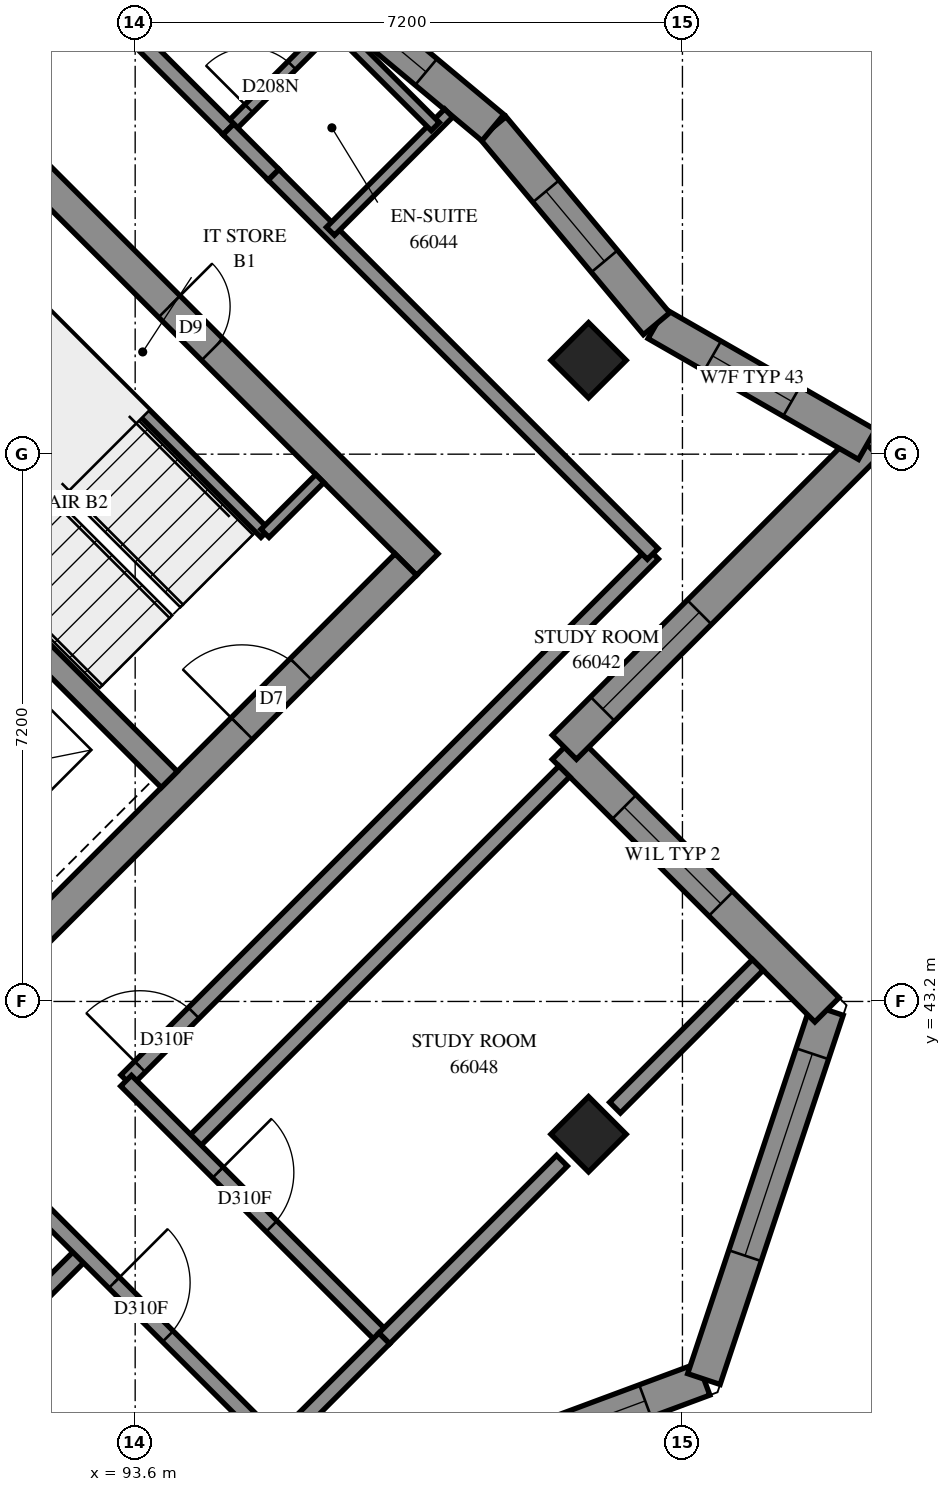
"""IFC4 building model, lengths in metres.
Left out: names, types, materials, properties, quantities, classifications, styles, units other than length and angle.
Written with IfcOpenShell. Run it as: python <this file> out.ifc"""

import sys

from ifc_helpers import new_model, si_unit, direction, frame, frame_2d, origin, origin_2d, place, context, subcontext, project, spatial, polyline, rectangle, outline, extrude, element, fill, save


model = new_model("IFC4")
c1 = context("Model", 3, precision=1e-05, world=origin(), true_north=direction((0.0, 1.0)))
c2 = subcontext(c1, "Body", "Model", "MODEL_VIEW")
j1 = project(units=[si_unit("LENGTHUNIT", "METRE"), si_unit("PLANEANGLEUNIT", "RADIAN")], contexts=[c1])
p1 = place(None, origin())
s1 = spatial("IfcSite", under=j1, at=p1, CompositionType="ELEMENT")
p2 = place(p1, origin())
s2 = spatial("IfcBuilding", under=s1, at=p2, CompositionType="ELEMENT")
p3 = place(p2, frame((0.0, 0.0, 243.8)))
s3 = spatial("IfcBuildingStorey", under=s2, at=p3, CompositionType="ELEMENT", Elevation=243.8)
for number, where, z_axis, x_axis in (
    (1, (99.565, 51.635, 0.0), (0.0, 0.0, 1.0), (0.707, -0.707, 0.0)),
    (2, (99.565, 41.453, 0.0), (0.0, 0.0, 1.0), (0.707, -0.707, 0.0)),
):
    element("IfcColumn", number, at=place(p3, frame(where, z_axis=z_axis, x_axis=x_axis)), inside=s3, PredefinedType="COLUMN", context=c2, shape_type="SweptSolid", body=[
        extrude(rectangle(XDim=0.7, YDim=0.7, at=origin_2d()), origin(), (0.0, 0.0, 1.0), 3.1),
    ])
p4 = place(p3, frame((86.695, 59.696, -0.3), z_axis=(0.0, 0.0, 1.0), x_axis=(0.7071100706, -0.7071034917, 0.0)))
e3 = element("IfcWall", 3, at=p4, inside=s3, PredefinedType="SHEAR", context=c2, shape_type="SweptSolid", body=[
    extrude(rectangle(XDim=15.2, YDim=0.4, at=frame_2d((7.6, 0.0))), origin(), (0.0, 0.0, 1.0), 2.7),
])
p5 = place(p4, frame((10.4, 0.0, 0.3)))
e4 = element("IfcOpeningElement", 4, at=p5, cuts=e3, PredefinedType="OPENING", context=c2, shape_type="SweptSolid", body=[
    extrude(rectangle(XDim=0.8, YDim=2.1, at=frame_2d((0.4, 1.05))), frame((0.0, 0.21, 0.0), z_axis=(0.0, -1.0, 0.0), x_axis=(1.0, 0.0, 0.0)), (0.0, 0.0, 1.0), 0.42),
])
p6 = place(p3, frame((86.978, 38.766, -0.3), z_axis=(0.0, 0.0, 1.0), x_axis=(0.7071067812, 0.7071067812, 0.0)))
e5 = element("IfcWall", 5, at=p6, inside=s3, PredefinedType="SHEAR", context=c2, shape_type="SweptSolid", body=[
    extrude(rectangle(XDim=14.4, YDim=0.4, at=frame_2d((7.2, 0.0))), origin(), (0.0, 0.0, 1.0), 2.7),
])
p7 = place(p6, frame((4.55, 0.0, 0.3)))
e6 = element("IfcOpeningElement", 6, at=p7, cuts=e5, PredefinedType="OPENING", context=c2, shape_type="SweptSolid", body=[
    extrude(rectangle(XDim=1.1, YDim=2.1, at=frame_2d((0.55, 1.05))), frame((0.0, 0.21, 0.0), z_axis=(0.0, -1.0, 0.0), x_axis=(1.0, 0.0, 0.0)), (0.0, 0.0, 1.0), 0.42),
])
p8 = place(p6, frame((11.35, 0.0, 0.3)))
e7 = element("IfcOpeningElement", 7, at=p8, cuts=e5, PredefinedType="OPENING", context=c2, shape_type="SweptSolid", body=[
    extrude(rectangle(XDim=1.1, YDim=2.1, at=frame_2d((0.55, 1.05))), frame((0.0, 0.21, 0.0), z_axis=(0.0, -1.0, 0.0), x_axis=(1.0, 0.0, 0.0)), (0.0, 0.0, 1.0), 0.42),
])
p9 = place(p3, frame((88.958, 51.211, 0.0), z_axis=(0.0, 0.0, 1.0), x_axis=(0.7070998367, -0.7071137256, 0.0)))
e8 = element("IfcWall", 8, at=p9, inside=s3, PredefinedType="SOLIDWALL", context=c2, shape_type="SweptSolid", body=[
    extrude(rectangle(XDim=7.2, YDim=0.3, at=frame_2d((3.6, 0.0))), origin(), (0.0, 0.0, 1.0), 3.1),
])
p10 = place(p3, frame((96.137, 36.395, 0.0), z_axis=(0.0, 0.0, 1.0), x_axis=(0.937429161, 0.3481760591, 0.0)))
e9 = element("IfcWall", 9, at=p10, inside=s3, PredefinedType="SOLIDWALL", context=c2, shape_type="SweptSolid", body=[
    extrude(outline(polyline([(0.103, -0.225), (5.383, -0.225), (5.168, 0.225), (-0.103, 0.225), (0.103, -0.225)])), origin(), (0.0, 0.0, 1.0), 3.1),
])
p11 = place(p10, frame((1.651, 0.0, 0.45)))
e10 = element("IfcOpeningElement", 10, at=p11, cuts=e9, PredefinedType="OPENING", context=c2, shape_type="SweptSolid", body=[
    extrude(rectangle(XDim=2.8, YDim=2.55, at=frame_2d((1.4, 1.275))), frame((0.0, 0.235, 0.0), z_axis=(0.0, -1.0, 0.0), x_axis=(1.0, 0.0, 0.0)), (0.0, 0.0, 1.0), 0.47),
])
p12 = place(p3, frame((101.082, 38.232, 0.0), z_axis=(0.0, 0.0, 1.0), x_axis=(0.316227766, 0.9486832981, 0.0)))
e11 = element("IfcWall", 11, at=p12, inside=s3, PredefinedType="SOLIDWALL", context=c2, shape_type="SweptSolid", body=[
    extrude(outline(polyline([(-0.108, -0.225), (5.259, -0.225), (4.981, 0.225), (0.108, 0.225), (-0.108, -0.225)])), origin(), (0.0, 0.0, 1.0), 3.1),
])
p13 = place(p12, frame((1.711, 0.0, 0.45)))
e12 = element("IfcOpeningElement", 12, at=p13, cuts=e11, PredefinedType="OPENING", context=c2, shape_type="SweptSolid", body=[
    extrude(rectangle(XDim=2.8, YDim=2.55, at=frame_2d((1.4, 1.275))), frame((0.0, 0.235, 0.0), z_axis=(0.0, -1.0, 0.0), x_axis=(1.0, 0.0, 0.0)), (0.0, 0.0, 1.0), 0.47),
])
p14 = place(p3, frame((102.701, 43.089, 0.0), z_axis=(0.0, 0.0, 1.0), x_axis=(-0.7070965479, 0.7071170144, 0.0)))
e13 = element("IfcWall", 13, at=p14, inside=s3, PredefinedType="SOLIDWALL", context=c2, shape_type="SweptSolid", body=[
    extrude(outline(polyline([(-0.139, -0.225), (4.661, -0.225), (5.111, 0.225), (0.139, 0.225), (-0.139, -0.225)])), origin(), (0.0, 0.0, 1.0), 3.1),
])
p15 = place(p14, frame((1.974, 0.0, 0.6)))
e14 = element("IfcOpeningElement", 14, at=p15, cuts=e13, PredefinedType="OPENING", context=c2, shape_type="SweptSolid", body=[
    extrude(rectangle(XDim=1.8, YDim=1.9, at=frame_2d((0.9, 0.95))), frame((0.0, 0.235, 0.0), z_axis=(0.0, -1.0, 0.0), x_axis=(1.0, 0.0, 0.0)), (0.0, 0.0, 1.0), 0.47),
])
p16 = place(p3, frame((99.246, 46.544, 0.0), z_axis=(0.0, 0.0, 1.0), x_axis=(0.7071067812, 0.7071067812, 0.0)))
e15 = element("IfcWall", 15, at=p16, inside=s3, PredefinedType="SOLIDWALL", context=c2, shape_type="SweptSolid", body=[
    extrude(outline(polyline([(0.225, -0.225), (5.925, -0.225), (5.337, 0.225), (-0.225, 0.225), (0.225, -0.225)])), origin(), (0.0, 0.0, 1.0), 3.1),
])
p17 = place(p16, frame((0.713, 0.0, 0.6)))
e16 = element("IfcOpeningElement", 16, at=p17, cuts=e15, PredefinedType="OPENING", context=c2, shape_type="SweptSolid", body=[
    extrude(rectangle(XDim=1.8, YDim=1.9, at=frame_2d((0.9, 0.95))), frame((0.0, 0.235, 0.0), z_axis=(0.0, -1.0, 0.0), x_axis=(1.0, 0.0, 0.0)), (0.0, 0.0, 1.0), 0.47),
])
p18 = place(p3, frame((103.228, 50.526, 0.0), z_axis=(0.0, 0.0, 1.0), x_axis=(-0.8672062632, 0.4979490909, 0.0)))
e17 = element("IfcWall", 17, at=p18, inside=s3, PredefinedType="SOLIDWALL", context=c2, shape_type="SweptSolid", body=[
    extrude(outline(polyline([(-0.294, -0.225), (3.153, -0.225), (3.233, 0.225), (0.294, 0.225), (-0.294, -0.225)])), origin(), (0.0, 0.0, 1.0), 3.1),
])
p19 = place(p18, frame((1.143, 0.0, 0.45)))
e18 = element("IfcOpeningElement", 18, at=p19, cuts=e17, PredefinedType="OPENING", context=c2, shape_type="SweptSolid", body=[
    extrude(rectangle(XDim=1.2, YDim=2.55, at=frame_2d((0.6, 1.275))), frame((0.0, 0.235, 0.0), z_axis=(0.0, -1.0, 0.0), x_axis=(1.0, 0.0, 0.0)), (0.0, 0.0, 1.0), 0.47),
])
p20 = place(p3, frame((100.459, 52.116, 0.0), z_axis=(0.0, 0.0, 1.0), x_axis=(-0.640760852, 0.767740536, 0.0)))
e19 = element("IfcWall", 19, at=p20, inside=s3, PredefinedType="SOLIDWALL", context=c2, shape_type="SweptSolid", body=[
    extrude(outline(polyline([(0.04, -0.225), (3.381, -0.225), (3.34, 0.225), (-0.04, 0.225), (0.04, -0.225)])), origin(), (0.0, 0.0, 1.0), 3.1),
])
p21 = place(p20, frame((1.07, 0.0, 0.45)))
e20 = element("IfcOpeningElement", 20, at=p21, cuts=e19, PredefinedType="OPENING", context=c2, shape_type="SweptSolid", body=[
    extrude(rectangle(XDim=1.2, YDim=2.55, at=frame_2d((0.6, 1.275))), frame((0.0, 0.235, 0.0), z_axis=(0.0, -1.0, 0.0), x_axis=(1.0, 0.0, 0.0)), (0.0, 0.0, 1.0), 0.47),
])
p22 = place(p3, frame((98.306, 54.696, 0.0), z_axis=(0.0, 0.0, 1.0), x_axis=(-0.7677450318, 0.6407554652, 0.0)))
e21 = element("IfcWall", 21, at=p22, inside=s3, PredefinedType="SOLIDWALL", context=c2, shape_type="SweptSolid", body=[
    extrude(outline(polyline([(-0.02, -0.225), (3.32, -0.225), (3.361, 0.225), (0.02, 0.225), (-0.02, -0.225)])), origin(), (0.0, 0.0, 1.0), 3.1),
])
p23 = place(p22, frame((1.144, 0.0, 0.45)))
e22 = element("IfcOpeningElement", 22, at=p23, cuts=e21, PredefinedType="OPENING", context=c2, shape_type="SweptSolid", body=[
    extrude(rectangle(XDim=1.2, YDim=2.55, at=frame_2d((0.6, 1.275))), frame((0.0, 0.235, 0.0), z_axis=(0.0, -1.0, 0.0), x_axis=(1.0, 0.0, 0.0)), (0.0, 0.0, 1.0), 0.47),
])
p24 = place(p3, frame((91.313, 53.354, 0.0), z_axis=(0.0, 0.0, 1.0), x_axis=(0.7071067812, -0.7071067812, 0.0)))
e23 = element("IfcWall", 23, at=p24, inside=s3, PredefinedType="PARTITIONING", context=c2, shape_type="SweptSolid", body=[
    extrude(rectangle(XDim=5.65, YDim=0.15, at=frame_2d((2.825, 0.0))), origin(), (0.0, 0.0, 1.0), 3.1),
])
p25 = place(p3, frame((95.308, 49.358, 0.0), z_axis=(0.0, 0.0, 1.0), x_axis=(0.70705776, 0.707155799, 0.0)))
e24 = element("IfcWall", 24, at=p25, inside=s3, PredefinedType="PARTITIONING", context=c2, shape_type="SweptSolid", body=[
    extrude(rectangle(XDim=1.02, YDim=0.15, at=frame_2d((0.51, 0.0))), origin(), (0.0, 0.0, 1.0), 3.1),
])
p26 = place(p3, frame((84.929, 31.91, 0.0), z_axis=(0.0, 0.0, 1.0), x_axis=(0.7071067812, 0.7071067812, 0.0)))
e25 = element("IfcWall", 25, at=p26, inside=s3, PredefinedType="PARTITIONING", context=c2, shape_type="SweptSolid", body=[
    extrude(rectangle(XDim=11.297, YDim=0.2, at=frame_2d((5.649, 0.0))), origin(), (0.0, 0.0, 1.0), 3.1),
])
p27 = place(p3, frame((93.483, 42.161, 0.0), z_axis=(0.0, 0.0, 1.0), x_axis=(0.7071067812, 0.7071067812, 0.0)))
e26 = element("IfcWall", 26, at=p27, inside=s3, PredefinedType="PARTITIONING", context=c2, shape_type="SweptSolid", body=[
    extrude(rectangle(XDim=9.8, YDim=0.2, at=frame_2d((4.9, 0.0))), origin(), (0.0, 0.0, 1.0), 3.1),
])
p28 = place(p27, frame((0.255, 0.0, 0.0)))
e27 = element("IfcOpeningElement", 27, at=p28, cuts=e26, PredefinedType="OPENING", context=c2, shape_type="SweptSolid", body=[
    extrude(rectangle(XDim=1.0, YDim=2.1, at=frame_2d((0.5, 1.05))), frame((0.0, 0.11, 0.0), z_axis=(0.0, -1.0, 0.0), x_axis=(1.0, 0.0, 0.0)), (0.0, 0.0, 1.0), 0.22),
])
p29 = place(p3, frame((95.419, 54.077, 0.0), z_axis=(0.0, 0.0, 1.0), x_axis=(0.7071067812, -0.7071067812, 0.0)))
e28 = element("IfcWall", 28, at=p29, inside=s3, PredefinedType="PARTITIONING", context=c2, shape_type="SweptSolid", body=[
    extrude(rectangle(XDim=7.057, YDim=0.2, at=frame_2d((3.528, 0.0))), origin(), (0.0, 0.0, 1.0), 3.1),
])
p30 = place(p3, frame((94.331, 41.313, 0.0), z_axis=(0.0, 0.0, 1.0), x_axis=(0.7071139756, 0.7070995867, 0.0)))
e29 = element("IfcWall", 29, at=p30, inside=s3, PredefinedType="PARTITIONING", context=c2, shape_type="SweptSolid", body=[
    extrude(rectangle(XDim=6.95, YDim=0.2, at=frame_2d((3.475, 0.0))), origin(), (0.0, 0.0, 1.0), 3.1),
])
p31 = place(p3, frame((93.481, 42.157, 0.0), z_axis=(0.0, 0.0, 1.0), x_axis=(0.7071067812, -0.7071067812, 0.0)))
e30 = element("IfcWall", 30, at=p31, inside=s3, PredefinedType="PARTITIONING", context=c2, shape_type="SweptSolid", body=[
    extrude(rectangle(XDim=4.8, YDim=0.2, at=frame_2d((2.4, 0.0))), origin(), (0.0, 0.0, 1.0), 3.1),
])
p32 = place(p31, frame((1.707, 0.0, 0.0)))
e31 = element("IfcOpeningElement", 31, at=p32, cuts=e30, PredefinedType="OPENING", context=c2, shape_type="SweptSolid", body=[
    extrude(rectangle(XDim=1.0, YDim=2.1, at=frame_2d((0.5, 1.05))), frame((0.0, 0.11, 0.0), z_axis=(0.0, -1.0, 0.0), x_axis=(1.0, 0.0, 0.0)), (0.0, 0.0, 1.0), 0.22),
])
p33 = place(p3, frame((92.073, 40.749, 0.0), z_axis=(0.0, 0.0, 1.0), x_axis=(0.7071067812, -0.7071067812, 0.0)))
e32 = element("IfcWall", 32, at=p33, inside=s3, PredefinedType="PARTITIONING", context=c2, shape_type="SweptSolid", body=[
    extrude(rectangle(XDim=4.8, YDim=0.2, at=frame_2d((2.4, 0.0))), origin(), (0.0, 0.0, 1.0), 3.1),
])
p34 = place(p33, frame((1.767, 0.0, 0.0)))
e33 = element("IfcOpeningElement", 33, at=p34, cuts=e32, PredefinedType="OPENING", context=c2, shape_type="SweptSolid", body=[
    extrude(rectangle(XDim=1.0, YDim=2.1, at=frame_2d((0.5, 1.05))), frame((0.0, 0.11, 0.0), z_axis=(0.0, -1.0, 0.0), x_axis=(1.0, 0.0, 0.0)), (0.0, 0.0, 1.0), 0.22),
])
p35 = place(p3, frame((96.877, 38.767, 0.0), z_axis=(0.0, 0.0, 1.0), x_axis=(0.7071067812, 0.7071067812, 0.0)))
e34 = element("IfcWall", 34, at=p35, inside=s3, PredefinedType="PARTITIONING", context=c2, shape_type="SweptSolid", body=[
    extrude(rectangle(XDim=3.306, YDim=0.2, at=frame_2d((1.653, 0.0))), origin(), (0.0, 0.0, 1.0), 2.6),
])
p36 = place(p3, frame((99.913, 41.803, 0.0), z_axis=(0.0, 0.0, 1.0), x_axis=(0.7071067812, 0.7071067812, 0.0)))
e35 = element("IfcWall", 35, at=p36, inside=s3, PredefinedType="PARTITIONING", context=c2, shape_type="SweptSolid", body=[
    extrude(rectangle(XDim=2.656, YDim=0.2, at=frame_2d((1.328, 0.0))), origin(), (0.0, 0.0, 1.0), 3.1),
])
p37 = place(p3, frame((96.169, 53.333, 0.0), z_axis=(0.0, 0.0, 1.0), x_axis=(0.7071067812, 0.7071067812, 0.0)))
e36 = element("IfcWall", 36, at=p37, inside=s3, PredefinedType="PARTITIONING", context=c2, shape_type="SweptSolid", body=[
    extrude(rectangle(XDim=2.2, YDim=0.15, at=frame_2d((1.1, 0.0))), origin(), (0.0, 0.0, 1.0), 3.1),
])
p38 = place(p3, frame((95.463, 37.353, 0.0), z_axis=(0.0, 0.0, 1.0), x_axis=(0.7071067812, 0.7071067812, 0.0)))
e37 = element("IfcWall", 37, at=p38, inside=s3, PredefinedType="PARTITIONING", context=c2, shape_type="SweptSolid", body=[
    extrude(rectangle(XDim=2.0, YDim=0.2, at=frame_2d((1.0, 0.0))), origin(), (0.0, 0.0, 1.0), 2.6),
])
p39 = place(p3, frame((94.827, 54.677, 0.0), z_axis=(0.0, 0.0, 1.0), x_axis=(0.7070821111, 0.7071314504, 0.0)))
e38 = element("IfcWall", 38, at=p39, inside=s3, PredefinedType="PARTITIONING", context=c2, shape_type="SweptSolid", body=[
    extrude(rectangle(XDim=2.027, YDim=0.15, at=frame_2d((1.013, 0.0))), origin(), (0.0, 0.0, 1.0), 3.1),
])
p40 = place(p39, frame((0.383, 0.0, 0.0)))
e39 = element("IfcOpeningElement", 39, at=p40, cuts=e38, PredefinedType="OPENING", context=c2, shape_type="SweptSolid", body=[
    extrude(rectangle(XDim=0.8, YDim=2.1, at=frame_2d((0.4, 1.05))), frame((0.0, 0.085, 0.0), z_axis=(0.0, -1.0, 0.0), x_axis=(1.0, 0.0, 0.0)), (0.0, 0.0, 1.0), 0.17),
])
p41 = place(p3, frame((96.222, 56.034, 0.0), z_axis=(0.0, 0.0, 1.0), x_axis=(0.7076402451, -0.7065729145, 0.0)))
e40 = element("IfcWall", 40, at=p41, inside=s3, PredefinedType="PARTITIONING", context=c2, shape_type="SweptSolid", body=[
    extrude(rectangle(XDim=1.874, YDim=0.15, at=frame_2d((0.937, 0.0))), origin(), (0.0, 0.0, 1.0), 3.1),
])
p42 = place(p3, frame((93.623, 55.877, 0.0), z_axis=(0.0, 0.0, 1.0), x_axis=(0.7076943229, -0.7065187509, 0.0)))
e41 = element("IfcWall", 41, at=p42, inside=s3, PredefinedType="PARTITIONING", context=c2, shape_type="SweptSolid", body=[
    extrude(rectangle(XDim=1.701, YDim=0.2, at=frame_2d((0.851, 0.0))), origin(), (0.0, 0.0, 1.0), 3.1),
])
p43 = place(p3, frame((94.826, 54.674, 0.0), z_axis=(0.0, 0.0, 1.0), x_axis=(0.7059173694, -0.7082941956, 0.0)))
e42 = element("IfcWall", 42, at=p43, inside=s3, PredefinedType="PARTITIONING", context=c2, shape_type="SweptSolid", body=[
    extrude(rectangle(XDim=0.842, YDim=0.2, at=frame_2d((0.421, 0.0))), origin(), (0.0, 0.0, 1.0), 3.1),
])
p44 = place(p11, origin())
e43 = element("IfcWindow", 43, at=p44, inside=s3, PartitioningType="SINGLE_PANEL", PredefinedType="WINDOW", context=c2, shape_type="SweptSolid", body=[
    extrude(rectangle(XDim=2.8, YDim=2.55, at=frame_2d((1.4, 1.275))), frame((0.0, 0.205, 0.0), z_axis=(0.0, -1.0, 0.0), x_axis=(1.0, 0.0, 0.0)), (0.0, 0.0, 1.0), 0.06),
])
fill(e10, e43)
p45 = place(p13, origin())
e44 = element("IfcWindow", 44, at=p45, inside=s3, PartitioningType="SINGLE_PANEL", PredefinedType="WINDOW", context=c2, shape_type="SweptSolid", body=[
    extrude(rectangle(XDim=2.8, YDim=2.55, at=frame_2d((1.4, 1.275))), frame((0.0, 0.205, 0.0), z_axis=(0.0, -1.0, 0.0), x_axis=(1.0, 0.0, 0.0)), (0.0, 0.0, 1.0), 0.06),
])
fill(e12, e44)
p46 = place(p15, origin())
e45 = element("IfcWindow", 45, at=p46, inside=s3, PartitioningType="SINGLE_PANEL", PredefinedType="WINDOW", context=c2, shape_type="SweptSolid", body=[
    extrude(rectangle(XDim=1.8, YDim=1.9, at=frame_2d((0.9, 0.95))), frame((0.0, 0.205, 0.0), z_axis=(0.0, -1.0, 0.0), x_axis=(1.0, 0.0, 0.0)), (0.0, 0.0, 1.0), 0.06),
])
fill(e14, e45)
p47 = place(p17, origin())
e46 = element("IfcWindow", 46, at=p47, inside=s3, PartitioningType="SINGLE_PANEL", PredefinedType="WINDOW", context=c2, shape_type="SweptSolid", body=[
    extrude(rectangle(XDim=1.8, YDim=1.9, at=frame_2d((0.9, 0.95))), frame((0.0, 0.205, 0.0), z_axis=(0.0, -1.0, 0.0), x_axis=(1.0, 0.0, 0.0)), (0.0, 0.0, 1.0), 0.06),
])
fill(e16, e46)
p48 = place(p19, origin())
e47 = element("IfcWindow", 47, at=p48, inside=s3, PartitioningType="SINGLE_PANEL", PredefinedType="WINDOW", context=c2, shape_type="SweptSolid", body=[
    extrude(rectangle(XDim=1.2, YDim=2.55, at=frame_2d((0.6, 1.275))), frame((0.0, 0.205, 0.0), z_axis=(0.0, -1.0, 0.0), x_axis=(1.0, 0.0, 0.0)), (0.0, 0.0, 1.0), 0.06),
])
fill(e18, e47)
p49 = place(p21, origin())
e48 = element("IfcWindow", 48, at=p49, inside=s3, PartitioningType="SINGLE_PANEL", PredefinedType="WINDOW", context=c2, shape_type="SweptSolid", body=[
    extrude(rectangle(XDim=1.2, YDim=2.55, at=frame_2d((0.6, 1.275))), frame((0.0, 0.205, 0.0), z_axis=(0.0, -1.0, 0.0), x_axis=(1.0, 0.0, 0.0)), (0.0, 0.0, 1.0), 0.06),
])
fill(e20, e48)
p50 = place(p23, origin())
e49 = element("IfcWindow", 49, at=p50, inside=s3, PartitioningType="SINGLE_PANEL", PredefinedType="WINDOW", context=c2, shape_type="SweptSolid", body=[
    extrude(rectangle(XDim=1.2, YDim=2.55, at=frame_2d((0.6, 1.275))), frame((0.0, 0.205, 0.0), z_axis=(0.0, -1.0, 0.0), x_axis=(1.0, 0.0, 0.0)), (0.0, 0.0, 1.0), 0.06),
])
fill(e22, e49)
p51 = place(p5, origin())
e50 = element("IfcDoor", 50, at=p51, inside=s3, OperationType="SINGLE_SWING_RIGHT", PredefinedType="DOOR", context=c2, shape_type="SweptSolid", body=[
    extrude(rectangle(XDim=0.8, YDim=2.1, at=frame_2d((0.4, 1.05))), frame((0.0, 0.025, 0.0), z_axis=(0.0, -1.0, 0.0), x_axis=(1.0, 0.0, 0.0)), (0.0, 0.0, 1.0), 0.05),
])
fill(e4, e50)
p52 = place(p8, origin())
e51 = element("IfcDoor", 51, at=p52, inside=s3, OperationType="SINGLE_SWING_RIGHT", PredefinedType="DOOR", context=c2, shape_type="SweptSolid", body=[
    extrude(rectangle(XDim=1.1, YDim=2.1, at=frame_2d((0.55, 1.05))), frame((0.0, 0.025, 0.0), z_axis=(0.0, -1.0, 0.0), x_axis=(1.0, 0.0, 0.0)), (0.0, 0.0, 1.0), 0.05),
])
fill(e7, e51)
p53 = place(p28, origin())
e52 = element("IfcDoor", 52, at=p53, inside=s3, OperationType="SINGLE_SWING_RIGHT", PredefinedType="DOOR", context=c2, shape_type="SweptSolid", body=[
    extrude(rectangle(XDim=1.0, YDim=2.1, at=frame_2d((0.5, 1.05))), frame((0.0, 0.025, 0.0), z_axis=(0.0, -1.0, 0.0), x_axis=(1.0, 0.0, 0.0)), (0.0, 0.0, 1.0), 0.05),
])
fill(e27, e52)
p54 = place(p40, origin())
e53 = element("IfcDoor", 53, at=p54, inside=s3, OperationType="SINGLE_SWING_RIGHT", PredefinedType="DOOR", context=c2, shape_type="SweptSolid", body=[
    extrude(rectangle(XDim=0.8, YDim=2.1, at=frame_2d((0.4, 1.05))), frame((0.0, 0.025, 0.0), z_axis=(0.0, -1.0, 0.0), x_axis=(1.0, 0.0, 0.0)), (0.0, 0.0, 1.0), 0.05),
])
fill(e39, e53)
p55 = place(p34, origin())
e54 = element("IfcDoor", 54, at=p55, inside=s3, OperationType="SINGLE_SWING_LEFT", PredefinedType="DOOR", context=c2, shape_type="SweptSolid", body=[
    extrude(rectangle(XDim=1.0, YDim=2.1, at=frame_2d((0.5, 1.05))), frame((0.0, 0.025, 0.0), z_axis=(0.0, -1.0, 0.0), x_axis=(1.0, 0.0, 0.0)), (0.0, 0.0, 1.0), 0.05),
])
fill(e33, e54)
p56 = place(p32, origin())
e55 = element("IfcDoor", 55, at=p56, inside=s3, OperationType="SINGLE_SWING_RIGHT", PredefinedType="DOOR", context=c2, shape_type="SweptSolid", body=[
    extrude(rectangle(XDim=1.0, YDim=2.1, at=frame_2d((0.5, 1.05))), frame((0.0, 0.025, 0.0), z_axis=(0.0, -1.0, 0.0), x_axis=(1.0, 0.0, 0.0)), (0.0, 0.0, 1.0), 0.05),
])
fill(e31, e55)
save(model, sys.argv[1])
